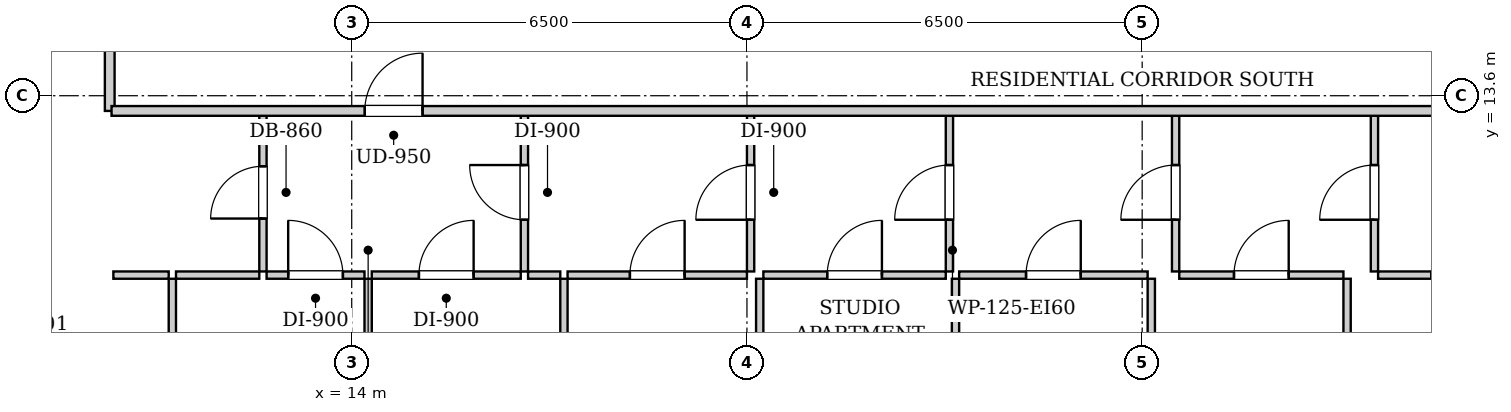
"""IFC4 building model, lengths in metres.
Left out: names, types, materials, properties, quantities, classifications, styles, units other than length and angle.
Written with IfcOpenShell. Run it as: python <this file> out.ifc"""

import sys

from ifc_helpers import new_model, si_unit, direction, frame, frame_2d, origin, place, context, subcontext, project, spatial, rectangle, extrude, element, fill, save


model = new_model("IFC4")
c1 = context("Model", 3, precision=1e-05, world=origin(), true_north=direction((0.0, 1.0)))
c2 = subcontext(c1, "Body", "Model", "MODEL_VIEW")
j1 = project(units=[si_unit("LENGTHUNIT", "METRE"), si_unit("PLANEANGLEUNIT", "RADIAN")], contexts=[c1])
p1 = place(None, origin())
s1 = spatial("IfcSite", under=j1, at=p1, CompositionType="ELEMENT")
p2 = place(p1, origin())
s2 = spatial("IfcBuilding", under=s1, at=p2, CompositionType="ELEMENT")
p3 = place(p2, frame((0.0, 0.0, 25.8)))
s3 = spatial("IfcBuildingStorey", under=s2, at=p3, CompositionType="ELEMENT", Elevation=25.8)
p4 = place(p3, frame((10.02, 13.35, 0.0), z_axis=(0.0, 0.0, 1.0), x_axis=(0.0, 1.0, 0.0)))
e1 = element("IfcWall", 1, at=p4, inside=s3, PredefinedType="PARTITIONING", context=c2, shape_type="SweptSolid", body=[
    extrude(rectangle(XDim=1.74, YDim=0.16, at=frame_2d((0.87, 0.0))), origin(), (0.0, 0.0, 1.0), 2.94),
])
p5 = place(p3, frame((12.54, 10.71, 0.0), z_axis=(0.0, 0.0, 1.0), x_axis=(0.0, 1.0, 0.0)))
e2 = element("IfcWall", 2, at=p5, inside=s3, PredefinedType="PARTITIONING", context=c2, shape_type="SweptSolid", body=[
    extrude(rectangle(XDim=2.6, YDim=0.12, at=frame_2d((1.3, 0.0))), origin(), (0.0, 0.0, 1.0), 2.94),
])
p6 = place(p5, frame((0.87, 0.0, 0.0)))
e3 = element("IfcOpeningElement", 3, at=p6, cuts=e2, PredefinedType="OPENING", context=c2, shape_type="SweptSolid", body=[
    extrude(rectangle(XDim=0.86, YDim=2.05, at=frame_2d((0.43, 1.025))), frame((0.0, 0.07, 0.0), z_axis=(0.0, -1.0, 0.0), x_axis=(1.0, 0.0, 0.0)), (0.0, 0.0, 1.0), 0.14),
])
p7 = place(p3, frame((10.08, 10.65, 0.0), z_axis=(0.0, 0.0, 1.0), x_axis=(1.0, 0.0, 0.0)))
e4 = element("IfcWall", 4, at=p7, inside=s3, PredefinedType="PARTITIONING", context=c2, shape_type="SweptSolid", body=[
    extrude(rectangle(XDim=0.91, YDim=0.12, at=frame_2d((0.455, 0.0))), origin(), (0.0, 0.0, 1.0), 2.94),
])
p8 = place(p3, frame((11.11, 10.65, 0.0), z_axis=(0.0, 0.0, 1.0), x_axis=(1.0, 0.0, 0.0)))
e5 = element("IfcWall", 5, at=p8, inside=s3, PredefinedType="PARTITIONING", context=c2, shape_type="SweptSolid", body=[
    extrude(rectangle(XDim=1.37, YDim=0.12, at=frame_2d((0.685, 0.0))), origin(), (0.0, 0.0, 1.0), 2.94),
])
p9 = place(p3, frame((16.84, 10.71, 0.0), z_axis=(0.0, 0.0, 1.0), x_axis=(0.0, 1.0, 0.0)))
e6 = element("IfcWall", 6, at=p9, inside=s3, PredefinedType="PARTITIONING", context=c2, shape_type="SweptSolid", body=[
    extrude(rectangle(XDim=2.6, YDim=0.12, at=frame_2d((1.3, 0.0))), origin(), (0.0, 0.0, 1.0), 2.94),
])
p10 = place(p9, frame((0.85, 0.0, 0.0)))
e7 = element("IfcOpeningElement", 7, at=p10, cuts=e6, PredefinedType="OPENING", context=c2, shape_type="SweptSolid", body=[
    extrude(rectangle(XDim=0.9, YDim=2.05, at=frame_2d((0.45, 1.025))), frame((0.0, 0.07, 0.0), z_axis=(0.0, -1.0, 0.0), x_axis=(1.0, 0.0, 0.0)), (0.0, 0.0, 1.0), 0.14),
])
p11 = place(p3, frame((12.6, 10.65, 0.0), z_axis=(0.0, 0.0, 1.0), x_axis=(1.0, 0.0, 0.0)))
e8 = element("IfcWall", 8, at=p11, inside=s3, PredefinedType="PARTITIONING", context=c2, shape_type="SweptSolid", body=[
    extrude(rectangle(XDim=1.61, YDim=0.12, at=frame_2d((0.805, 0.0))), origin(), (0.0, 0.0, 1.0), 2.94),
])
p12 = place(p11, frame((0.355, 0.0, 0.0)))
e9 = element("IfcOpeningElement", 9, at=p12, cuts=e8, PredefinedType="OPENING", context=c2, shape_type="SweptSolid", body=[
    extrude(rectangle(XDim=0.9, YDim=2.05, at=frame_2d((0.45, 1.025))), frame((0.0, 0.07, 0.0), z_axis=(0.0, -1.0, 0.0), x_axis=(1.0, 0.0, 0.0)), (0.0, 0.0, 1.0), 0.14),
])
p13 = place(p3, frame((14.33, 10.65, 0.0), z_axis=(0.0, 0.0, 1.0), x_axis=(1.0, 0.0, 0.0)))
e10 = element("IfcWall", 10, at=p13, inside=s3, PredefinedType="PARTITIONING", context=c2, shape_type="SweptSolid", body=[
    extrude(rectangle(XDim=2.45, YDim=0.12, at=frame_2d((1.225, 0.0))), origin(), (0.0, 0.0, 1.0), 2.94),
])
p14 = place(p13, frame((0.775, 0.0, 0.0)))
e11 = element("IfcOpeningElement", 11, at=p14, cuts=e10, PredefinedType="OPENING", context=c2, shape_type="SweptSolid", body=[
    extrude(rectangle(XDim=0.9, YDim=2.05, at=frame_2d((0.45, 1.025))), frame((0.0, 0.07, 0.0), z_axis=(0.0, -1.0, 0.0), x_axis=(1.0, 0.0, 0.0)), (0.0, 0.0, 1.0), 0.14),
])
p15 = place(p3, frame((20.56, 10.71, 0.0), z_axis=(0.0, 0.0, 1.0), x_axis=(0.0, 1.0, 0.0)))
e12 = element("IfcWall", 12, at=p15, inside=s3, PredefinedType="PARTITIONING", context=c2, shape_type="SweptSolid", body=[
    extrude(rectangle(XDim=2.6, YDim=0.12, at=frame_2d((1.3, 0.0))), origin(), (0.0, 0.0, 1.0), 2.94),
])
p16 = place(p15, frame((0.85, 0.0, 0.0)))
e13 = element("IfcOpeningElement", 13, at=p16, cuts=e12, PredefinedType="OPENING", context=c2, shape_type="SweptSolid", body=[
    extrude(rectangle(XDim=0.9, YDim=2.05, at=frame_2d((0.45, 1.025))), frame((0.0, 0.07, 0.0), z_axis=(0.0, -1.0, 0.0), x_axis=(1.0, 0.0, 0.0)), (0.0, 0.0, 1.0), 0.14),
])
p17 = place(p3, frame((16.9, 10.65, 0.0), z_axis=(0.0, 0.0, 1.0), x_axis=(1.0, 0.0, 0.0)))
e14 = element("IfcWall", 14, at=p17, inside=s3, PredefinedType="PARTITIONING", context=c2, shape_type="SweptSolid", body=[
    extrude(rectangle(XDim=0.53, YDim=0.12, at=frame_2d((0.265, 0.0))), origin(), (0.0, 0.0, 1.0), 2.94),
])
p18 = place(p3, frame((17.55, 10.65, 0.0), z_axis=(0.0, 0.0, 1.0), x_axis=(1.0, 0.0, 0.0)))
e15 = element("IfcWall", 15, at=p18, inside=s3, PredefinedType="PARTITIONING", context=c2, shape_type="SweptSolid", body=[
    extrude(rectangle(XDim=2.95, YDim=0.12, at=frame_2d((1.475, 0.0))), origin(), (0.0, 0.0, 1.0), 2.94),
])
p19 = place(p18, frame((1.025, 0.0, 0.0)))
e16 = element("IfcOpeningElement", 16, at=p19, cuts=e15, PredefinedType="OPENING", context=c2, shape_type="SweptSolid", body=[
    extrude(rectangle(XDim=0.9, YDim=2.05, at=frame_2d((0.45, 1.025))), frame((0.0, 0.07, 0.0), z_axis=(0.0, -1.0, 0.0), x_axis=(1.0, 0.0, 0.0)), (0.0, 0.0, 1.0), 0.14),
])
p20 = place(p3, frame((23.83, 10.71, 0.0), z_axis=(0.0, 0.0, 1.0), x_axis=(0.0, 1.0, 0.0)))
e17 = element("IfcWall", 17, at=p20, inside=s3, PredefinedType="PARTITIONING", context=c2, shape_type="SweptSolid", body=[
    extrude(rectangle(XDim=2.6, YDim=0.12, at=frame_2d((1.3, 0.0))), origin(), (0.0, 0.0, 1.0), 2.94),
])
p21 = place(p20, frame((0.85, 0.0, 0.0)))
e18 = element("IfcOpeningElement", 18, at=p21, cuts=e17, PredefinedType="OPENING", context=c2, shape_type="SweptSolid", body=[
    extrude(rectangle(XDim=0.9, YDim=2.05, at=frame_2d((0.45, 1.025))), frame((0.0, 0.07, 0.0), z_axis=(0.0, -1.0, 0.0), x_axis=(1.0, 0.0, 0.0)), (0.0, 0.0, 1.0), 0.14),
])
p22 = place(p3, frame((20.77, 10.65, 0.0), z_axis=(0.0, 0.0, 1.0), x_axis=(1.0, 0.0, 0.0)))
e19 = element("IfcWall", 19, at=p22, inside=s3, PredefinedType="PARTITIONING", context=c2, shape_type="SweptSolid", body=[
    extrude(rectangle(XDim=3.0, YDim=0.12, at=frame_2d((1.5, 0.0))), origin(), (0.0, 0.0, 1.0), 2.94),
])
p23 = place(p22, frame((1.05, 0.0, 0.0)))
e20 = element("IfcOpeningElement", 20, at=p23, cuts=e19, PredefinedType="OPENING", context=c2, shape_type="SweptSolid", body=[
    extrude(rectangle(XDim=0.9, YDim=2.05, at=frame_2d((0.45, 1.025))), frame((0.0, 0.07, 0.0), z_axis=(0.0, -1.0, 0.0), x_axis=(1.0, 0.0, 0.0)), (0.0, 0.0, 1.0), 0.14),
])
p24 = place(p3, frame((27.55, 10.71, 0.0), z_axis=(0.0, 0.0, 1.0), x_axis=(0.0, 1.0, 0.0)))
e21 = element("IfcWall", 21, at=p24, inside=s3, PredefinedType="PARTITIONING", context=c2, shape_type="SweptSolid", body=[
    extrude(rectangle(XDim=2.6, YDim=0.12, at=frame_2d((1.3, 0.0))), origin(), (0.0, 0.0, 1.0), 2.94),
])
p25 = place(p24, frame((0.85, 0.0, 0.0)))
e22 = element("IfcOpeningElement", 22, at=p25, cuts=e21, PredefinedType="OPENING", context=c2, shape_type="SweptSolid", body=[
    extrude(rectangle(XDim=0.9, YDim=2.05, at=frame_2d((0.45, 1.025))), frame((0.0, 0.07, 0.0), z_axis=(0.0, -1.0, 0.0), x_axis=(1.0, 0.0, 0.0)), (0.0, 0.0, 1.0), 0.14),
])
p26 = place(p3, frame((23.99, 10.65, 0.0), z_axis=(0.0, 0.0, 1.0), x_axis=(1.0, 0.0, 0.0)))
e23 = element("IfcWall", 23, at=p26, inside=s3, PredefinedType="PARTITIONING", context=c2, shape_type="SweptSolid", body=[
    extrude(rectangle(XDim=3.1, YDim=0.12, at=frame_2d((1.55, 0.0))), origin(), (0.0, 0.0, 1.0), 2.94),
])
p27 = place(p26, frame((1.1, 0.0, 0.0)))
e24 = element("IfcOpeningElement", 24, at=p27, cuts=e23, PredefinedType="OPENING", context=c2, shape_type="SweptSolid", body=[
    extrude(rectangle(XDim=0.9, YDim=2.05, at=frame_2d((0.45, 1.025))), frame((0.0, 0.07, 0.0), z_axis=(0.0, -1.0, 0.0), x_axis=(1.0, 0.0, 0.0)), (0.0, 0.0, 1.0), 0.14),
])
p28 = place(p3, frame((30.82, 10.71, 0.0), z_axis=(0.0, 0.0, 1.0), x_axis=(0.0, 1.0, 0.0)))
e25 = element("IfcWall", 25, at=p28, inside=s3, PredefinedType="PARTITIONING", context=c2, shape_type="SweptSolid", body=[
    extrude(rectangle(XDim=2.6, YDim=0.12, at=frame_2d((1.3, 0.0))), origin(), (0.0, 0.0, 1.0), 2.94),
])
p29 = place(p28, frame((0.85, 0.0, 0.0)))
e26 = element("IfcOpeningElement", 26, at=p29, cuts=e25, PredefinedType="OPENING", context=c2, shape_type="SweptSolid", body=[
    extrude(rectangle(XDim=0.9, YDim=2.05, at=frame_2d((0.45, 1.025))), frame((0.0, 0.07, 0.0), z_axis=(0.0, -1.0, 0.0), x_axis=(1.0, 0.0, 0.0)), (0.0, 0.0, 1.0), 0.14),
])
p30 = place(p3, frame((27.61, 10.65, 0.0), z_axis=(0.0, 0.0, 1.0), x_axis=(1.0, 0.0, 0.0)))
e27 = element("IfcWall", 27, at=p30, inside=s3, PredefinedType="PARTITIONING", context=c2, shape_type="SweptSolid", body=[
    extrude(rectangle(XDim=2.7, YDim=0.12, at=frame_2d((1.35, 0.0))), origin(), (0.0, 0.0, 1.0), 2.94),
])
p31 = place(p30, frame((0.9, 0.0, 0.0)))
e28 = element("IfcOpeningElement", 28, at=p31, cuts=e27, PredefinedType="OPENING", context=c2, shape_type="SweptSolid", body=[
    extrude(rectangle(XDim=0.9, YDim=2.05, at=frame_2d((0.45, 1.025))), frame((0.0, 0.07, 0.0), z_axis=(0.0, -1.0, 0.0), x_axis=(1.0, 0.0, 0.0)), (0.0, 0.0, 1.0), 0.14),
])
p32 = place(p3, frame((30.88, 10.65, 0.0), z_axis=(0.0, 0.0, 1.0), x_axis=(1.0, 0.0, 0.0)))
e29 = element("IfcWall", 29, at=p32, inside=s3, PredefinedType="PARTITIONING", context=c2, shape_type="SweptSolid", body=[
    extrude(rectangle(XDim=2.65, YDim=0.12, at=frame_2d((1.325, 0.0))), origin(), (0.0, 0.0, 1.0), 2.94),
])
p33 = place(p32, frame((0.875, 0.0, 0.0)))
e30 = element("IfcOpeningElement", 30, at=p33, cuts=e29, PredefinedType="OPENING", context=c2, shape_type="SweptSolid", body=[
    extrude(rectangle(XDim=0.9, YDim=2.05, at=frame_2d((0.45, 1.025))), frame((0.0, 0.07, 0.0), z_axis=(0.0, -1.0, 0.0), x_axis=(1.0, 0.0, 0.0)), (0.0, 0.0, 1.0), 0.14),
])
p34 = place(p3, frame((11.05, 0.28, 0.0), z_axis=(0.0, 0.0, 1.0), x_axis=(0.0, 1.0, 0.0)))
e31 = element("IfcWall", 31, at=p34, inside=s3, PredefinedType="PARTITIONING", context=c2, shape_type="SweptSolid", body=[
    extrude(rectangle(XDim=10.31, YDim=0.12, at=frame_2d((5.155, 0.0))), origin(), (0.0, 0.0, 1.0), 2.94),
])
p35 = place(p34, frame((4.69, 0.0, 0.0)))
e32 = element("IfcOpeningElement", 32, at=p35, cuts=e31, PredefinedType="OPENING", context=c2, shape_type="SweptSolid", body=[
    extrude(rectangle(XDim=0.9, YDim=2.05, at=frame_2d((0.45, 1.025))), frame((0.0, 0.07, 0.0), z_axis=(0.0, -1.0, 0.0), x_axis=(1.0, 0.0, 0.0)), (0.0, 0.0, 1.0), 0.14),
])
p36 = place(p3, frame((14.27, 2.43, 0.0), z_axis=(0.0, 0.0, 1.0), x_axis=(0.0, 1.0, 0.0)))
e33 = element("IfcWall", 33, at=p36, inside=s3, PredefinedType="PARTITIONING", context=c2, shape_type="SweptSolid", body=[
    extrude(rectangle(XDim=8.16, YDim=0.12, at=frame_2d((4.08, 0.0))), origin(), (0.0, 0.0, 1.0), 2.94),
])
p37 = place(p36, frame((3.63, 0.0, 0.0)))
e34 = element("IfcOpeningElement", 34, at=p37, cuts=e33, PredefinedType="OPENING", context=c2, shape_type="SweptSolid", body=[
    extrude(rectangle(XDim=0.9, YDim=2.05, at=frame_2d((0.45, 1.025))), frame((0.0, 0.07, 0.0), z_axis=(0.0, -1.0, 0.0), x_axis=(1.0, 0.0, 0.0)), (0.0, 0.0, 1.0), 0.14),
])
p38 = place(p3, frame((17.49, 0.28, 0.0), z_axis=(0.0, 0.0, 1.0), x_axis=(0.0, 1.0, 0.0)))
e35 = element("IfcWall", 35, at=p38, inside=s3, PredefinedType="PARTITIONING", context=c2, shape_type="SweptSolid", body=[
    extrude(rectangle(XDim=10.31, YDim=0.12, at=frame_2d((5.155, 0.0))), origin(), (0.0, 0.0, 1.0), 2.94),
])
p39 = place(p38, frame((4.69, 0.0, 0.0)))
e36 = element("IfcOpeningElement", 36, at=p39, cuts=e35, PredefinedType="OPENING", context=c2, shape_type="SweptSolid", body=[
    extrude(rectangle(XDim=0.9, YDim=2.05, at=frame_2d((0.45, 1.025))), frame((0.0, 0.07, 0.0), z_axis=(0.0, -1.0, 0.0), x_axis=(1.0, 0.0, 0.0)), (0.0, 0.0, 1.0), 0.14),
])
p40 = place(p3, frame((20.71, 0.28, 0.0), z_axis=(0.0, 0.0, 1.0), x_axis=(0.0, 1.0, 0.0)))
e37 = element("IfcWall", 37, at=p40, inside=s3, PredefinedType="PARTITIONING", context=c2, shape_type="SweptSolid", body=[
    extrude(rectangle(XDim=10.31, YDim=0.12, at=frame_2d((5.155, 0.0))), origin(), (0.0, 0.0, 1.0), 2.94),
])
p41 = place(p40, frame((4.69, 0.0, 0.0)))
e38 = element("IfcOpeningElement", 38, at=p41, cuts=e37, PredefinedType="OPENING", context=c2, shape_type="SweptSolid", body=[
    extrude(rectangle(XDim=0.9, YDim=2.05, at=frame_2d((0.45, 1.025))), frame((0.0, 0.07, 0.0), z_axis=(0.0, -1.0, 0.0), x_axis=(1.0, 0.0, 0.0)), (0.0, 0.0, 1.0), 0.14),
])
p42 = place(p3, frame((23.93, 0.28, 0.0), z_axis=(0.0, 0.0, 1.0), x_axis=(0.0, 1.0, 0.0)))
e39 = element("IfcWall", 39, at=p42, inside=s3, PredefinedType="PARTITIONING", context=c2, shape_type="SweptSolid", body=[
    extrude(rectangle(XDim=10.31, YDim=0.12, at=frame_2d((5.155, 0.0))), origin(), (0.0, 0.0, 1.0), 2.94),
])
p43 = place(p42, frame((4.69, 0.0, 0.0)))
e40 = element("IfcOpeningElement", 40, at=p43, cuts=e39, PredefinedType="OPENING", context=c2, shape_type="SweptSolid", body=[
    extrude(rectangle(XDim=0.9, YDim=2.05, at=frame_2d((0.45, 1.025))), frame((0.0, 0.07, 0.0), z_axis=(0.0, -1.0, 0.0), x_axis=(1.0, 0.0, 0.0)), (0.0, 0.0, 1.0), 0.14),
])
p44 = place(p3, frame((27.15, 0.28, 0.0), z_axis=(0.0, 0.0, 1.0), x_axis=(0.0, 1.0, 0.0)))
e41 = element("IfcWall", 41, at=p44, inside=s3, PredefinedType="PARTITIONING", context=c2, shape_type="SweptSolid", body=[
    extrude(rectangle(XDim=10.31, YDim=0.12, at=frame_2d((5.155, 0.0))), origin(), (0.0, 0.0, 1.0), 2.94),
])
p45 = place(p44, frame((4.69, 0.0, 0.0)))
e42 = element("IfcOpeningElement", 42, at=p45, cuts=e41, PredefinedType="OPENING", context=c2, shape_type="SweptSolid", body=[
    extrude(rectangle(XDim=0.9, YDim=2.05, at=frame_2d((0.45, 1.025))), frame((0.0, 0.07, 0.0), z_axis=(0.0, -1.0, 0.0), x_axis=(1.0, 0.0, 0.0)), (0.0, 0.0, 1.0), 0.14),
])
p46 = place(p3, frame((30.37, 0.28, 0.0), z_axis=(0.0, 0.0, 1.0), x_axis=(0.0, 1.0, 0.0)))
e43 = element("IfcWall", 43, at=p46, inside=s3, PredefinedType="PARTITIONING", context=c2, shape_type="SweptSolid", body=[
    extrude(rectangle(XDim=10.31, YDim=0.12, at=frame_2d((5.155, 0.0))), origin(), (0.0, 0.0, 1.0), 2.94),
])
p47 = place(p46, frame((4.69, 0.0, 0.0)))
e44 = element("IfcOpeningElement", 44, at=p47, cuts=e43, PredefinedType="OPENING", context=c2, shape_type="SweptSolid", body=[
    extrude(rectangle(XDim=0.9, YDim=2.05, at=frame_2d((0.45, 1.025))), frame((0.0, 0.07, 0.0), z_axis=(0.0, -1.0, 0.0), x_axis=(1.0, 0.0, 0.0)), (0.0, 0.0, 1.0), 0.14),
])
p48 = place(p3, frame((10.05, 13.35, 0.0), z_axis=(0.0, 0.0, 1.0), x_axis=(1.0, 0.0, 0.0)))
e45 = element("IfcWall", 45, at=p48, inside=s3, PredefinedType="PARTITIONING", context=c2, shape_type="SweptSolid", body=[
    extrude(rectangle(XDim=33.9, YDim=0.16, at=frame_2d((16.95, 0.0))), origin(), (0.0, 0.0, 1.0), 2.94),
])
p49 = place(p48, frame((4.165, 0.0, 0.0)))
e46 = element("IfcOpeningElement", 46, at=p49, cuts=e45, PredefinedType="OPENING", context=c2, shape_type="SweptSolid", body=[
    extrude(rectangle(XDim=0.95, YDim=2.1, at=frame_2d((0.475, 1.05))), frame((0.0, 0.09, 0.0), z_axis=(0.0, -1.0, 0.0), x_axis=(1.0, 0.0, 0.0)), (0.0, 0.0, 1.0), 0.18),
])
p50 = place(p6, origin())
e47 = element("IfcDoor", 47, at=p50, inside=s3, OperationType="SINGLE_SWING_LEFT", PredefinedType="DOOR", context=c2, shape_type="SweptSolid", body=[
    extrude(rectangle(XDim=0.86, YDim=2.05, at=frame_2d((0.43, 1.025))), frame((0.0, 0.025, 0.0), z_axis=(0.0, -1.0, 0.0), x_axis=(1.0, 0.0, 0.0)), (0.0, 0.0, 1.0), 0.05),
])
fill(e3, e47)
p51 = place(p10, origin())
e48 = element("IfcDoor", 48, at=p51, inside=s3, OperationType="SINGLE_SWING_RIGHT", PredefinedType="DOOR", context=c2, shape_type="SweptSolid", body=[
    extrude(rectangle(XDim=0.9, YDim=2.05, at=frame_2d((0.45, 1.025))), frame((0.0, 0.025, 0.0), z_axis=(0.0, -1.0, 0.0), x_axis=(1.0, 0.0, 0.0)), (0.0, 0.0, 1.0), 0.05),
])
fill(e7, e48)
p52 = place(p12, origin())
e49 = element("IfcDoor", 49, at=p52, inside=s3, OperationType="SINGLE_SWING_LEFT", PredefinedType="DOOR", context=c2, shape_type="SweptSolid", body=[
    extrude(rectangle(XDim=0.9, YDim=2.05, at=frame_2d((0.45, 1.025))), frame((0.0, 0.025, 0.0), z_axis=(0.0, -1.0, 0.0), x_axis=(1.0, 0.0, 0.0)), (0.0, 0.0, 1.0), 0.05),
])
fill(e9, e49)
p53 = place(p14, origin())
e50 = element("IfcDoor", 50, at=p53, inside=s3, OperationType="SINGLE_SWING_RIGHT", PredefinedType="DOOR", context=c2, shape_type="SweptSolid", body=[
    extrude(rectangle(XDim=0.9, YDim=2.05, at=frame_2d((0.45, 1.025))), frame((0.0, 0.025, 0.0), z_axis=(0.0, -1.0, 0.0), x_axis=(1.0, 0.0, 0.0)), (0.0, 0.0, 1.0), 0.05),
])
fill(e11, e50)
p54 = place(p16, origin())
e51 = element("IfcDoor", 51, at=p54, inside=s3, OperationType="SINGLE_SWING_LEFT", PredefinedType="DOOR", context=c2, shape_type="SweptSolid", body=[
    extrude(rectangle(XDim=0.9, YDim=2.05, at=frame_2d((0.45, 1.025))), frame((0.0, 0.025, 0.0), z_axis=(0.0, -1.0, 0.0), x_axis=(1.0, 0.0, 0.0)), (0.0, 0.0, 1.0), 0.05),
])
fill(e13, e51)
p55 = place(p19, origin())
e52 = element("IfcDoor", 52, at=p55, inside=s3, OperationType="SINGLE_SWING_RIGHT", PredefinedType="DOOR", context=c2, shape_type="SweptSolid", body=[
    extrude(rectangle(XDim=0.9, YDim=2.05, at=frame_2d((0.45, 1.025))), frame((0.0, 0.025, 0.0), z_axis=(0.0, -1.0, 0.0), x_axis=(1.0, 0.0, 0.0)), (0.0, 0.0, 1.0), 0.05),
])
fill(e16, e52)
p56 = place(p21, origin())
e53 = element("IfcDoor", 53, at=p56, inside=s3, OperationType="SINGLE_SWING_LEFT", PredefinedType="DOOR", context=c2, shape_type="SweptSolid", body=[
    extrude(rectangle(XDim=0.9, YDim=2.05, at=frame_2d((0.45, 1.025))), frame((0.0, 0.025, 0.0), z_axis=(0.0, -1.0, 0.0), x_axis=(1.0, 0.0, 0.0)), (0.0, 0.0, 1.0), 0.05),
])
fill(e18, e53)
p57 = place(p23, origin())
e54 = element("IfcDoor", 54, at=p57, inside=s3, OperationType="SINGLE_SWING_RIGHT", PredefinedType="DOOR", context=c2, shape_type="SweptSolid", body=[
    extrude(rectangle(XDim=0.9, YDim=2.05, at=frame_2d((0.45, 1.025))), frame((0.0, 0.025, 0.0), z_axis=(0.0, -1.0, 0.0), x_axis=(1.0, 0.0, 0.0)), (0.0, 0.0, 1.0), 0.05),
])
fill(e20, e54)
p58 = place(p25, origin())
e55 = element("IfcDoor", 55, at=p58, inside=s3, OperationType="SINGLE_SWING_LEFT", PredefinedType="DOOR", context=c2, shape_type="SweptSolid", body=[
    extrude(rectangle(XDim=0.9, YDim=2.05, at=frame_2d((0.45, 1.025))), frame((0.0, 0.025, 0.0), z_axis=(0.0, -1.0, 0.0), x_axis=(1.0, 0.0, 0.0)), (0.0, 0.0, 1.0), 0.05),
])
fill(e22, e55)
p59 = place(p27, origin())
e56 = element("IfcDoor", 56, at=p59, inside=s3, OperationType="SINGLE_SWING_RIGHT", PredefinedType="DOOR", context=c2, shape_type="SweptSolid", body=[
    extrude(rectangle(XDim=0.9, YDim=2.05, at=frame_2d((0.45, 1.025))), frame((0.0, 0.025, 0.0), z_axis=(0.0, -1.0, 0.0), x_axis=(1.0, 0.0, 0.0)), (0.0, 0.0, 1.0), 0.05),
])
fill(e24, e56)
p60 = place(p29, origin())
e57 = element("IfcDoor", 57, at=p60, inside=s3, OperationType="SINGLE_SWING_LEFT", PredefinedType="DOOR", context=c2, shape_type="SweptSolid", body=[
    extrude(rectangle(XDim=0.9, YDim=2.05, at=frame_2d((0.45, 1.025))), frame((0.0, 0.025, 0.0), z_axis=(0.0, -1.0, 0.0), x_axis=(1.0, 0.0, 0.0)), (0.0, 0.0, 1.0), 0.05),
])
fill(e26, e57)
p61 = place(p31, origin())
e58 = element("IfcDoor", 58, at=p61, inside=s3, OperationType="SINGLE_SWING_RIGHT", PredefinedType="DOOR", context=c2, shape_type="SweptSolid", body=[
    extrude(rectangle(XDim=0.9, YDim=2.05, at=frame_2d((0.45, 1.025))), frame((0.0, 0.025, 0.0), z_axis=(0.0, -1.0, 0.0), x_axis=(1.0, 0.0, 0.0)), (0.0, 0.0, 1.0), 0.05),
])
fill(e28, e58)
p62 = place(p33, origin())
e59 = element("IfcDoor", 59, at=p62, inside=s3, OperationType="SINGLE_SWING_RIGHT", PredefinedType="DOOR", context=c2, shape_type="SweptSolid", body=[
    extrude(rectangle(XDim=0.9, YDim=2.05, at=frame_2d((0.45, 1.025))), frame((0.0, 0.025, 0.0), z_axis=(0.0, -1.0, 0.0), x_axis=(1.0, 0.0, 0.0)), (0.0, 0.0, 1.0), 0.05),
])
fill(e30, e59)
p63 = place(p49, origin())
e60 = element("IfcDoor", 60, at=p63, inside=s3, OperationType="SINGLE_SWING_RIGHT", PredefinedType="DOOR", context=c2, shape_type="SweptSolid", body=[
    extrude(rectangle(XDim=0.95, YDim=2.1, at=frame_2d((0.475, 1.05))), frame((0.0, 0.025, 0.0), z_axis=(0.0, -1.0, 0.0), x_axis=(1.0, 0.0, 0.0)), (0.0, 0.0, 1.0), 0.05),
])
fill(e46, e60)
save(model, sys.argv[1])
